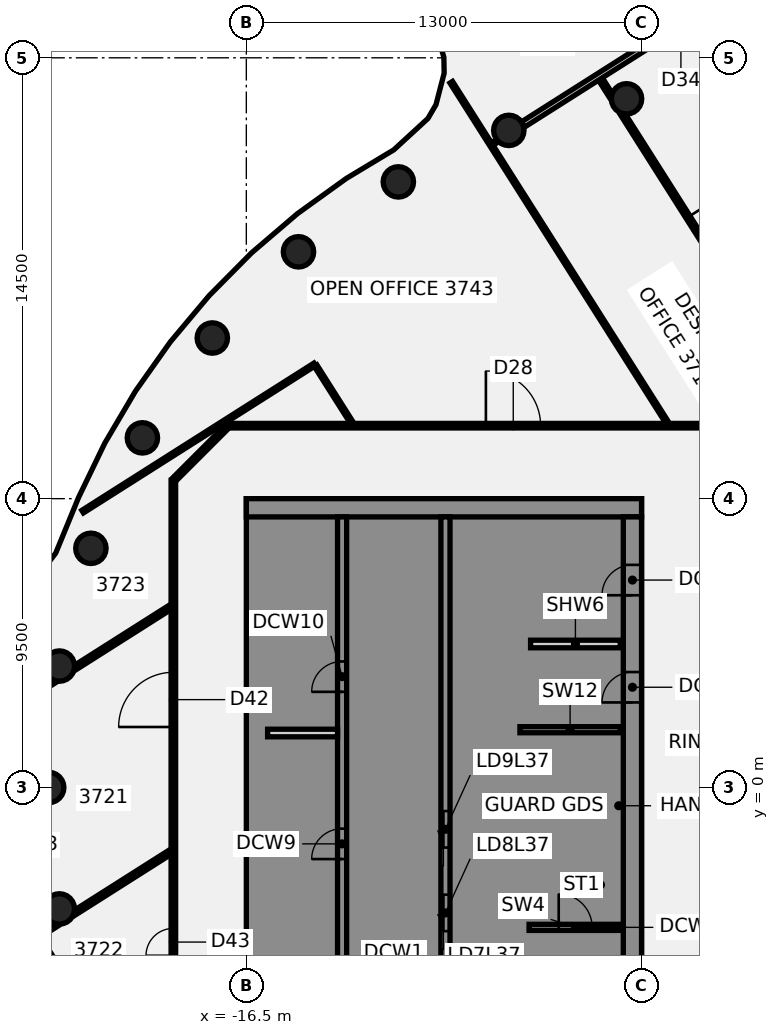
"""IFC4 building model, lengths in metres.
Left out: names, types, materials, properties, quantities, classifications, styles, units other than length and angle.
Written with IfcOpenShell. Run it as: python <this file> out.ifc"""

import sys

from ifc_helpers import new_model, si_unit, direction, frame, frame_2d, origin, origin_2d, place, context, subcontext, project, spatial, polyline, rectangle, circle, outline, extrude, element, fill, save


model = new_model("IFC4")
c1 = context("Model", 3, precision=1e-05, world=origin(), true_north=direction((0.0, 1.0)))
c2 = subcontext(c1, "Body", "Model", "MODEL_VIEW")
j1 = project(units=[si_unit("LENGTHUNIT", "METRE"), si_unit("PLANEANGLEUNIT", "RADIAN")], contexts=[c1])
p1 = place(None, origin())
s1 = spatial("IfcSite", under=j1, at=p1, CompositionType="ELEMENT")
p2 = place(p1, origin())
s2 = spatial("IfcBuilding", under=s1, at=p2, CompositionType="ELEMENT")
p3 = place(p2, frame((0.0, 0.0, 151.75)))
s3 = spatial("IfcBuildingStorey", under=s2, at=p3, CompositionType="ELEMENT", Elevation=151.75)
for number, where, z_axis, x_axis in (
    (1, (-3.994, 22.651, -0.14), (0.0, 0.0, 1.0), (1.0, 0.0, 0.0)),
    (2, (-7.866, 21.613, -0.14), (0.0, 0.0, 1.0), (1.0, 0.0, 0.0)),
    (3, (-11.5, 19.919, -0.14), (0.0, 0.0, 1.0), (1.0, 0.0, 0.0)),
    (4, (-14.784, 17.619, -0.14), (0.0, 0.0, 1.0), (1.0, 0.0, 0.0)),
    (5, (-17.619, 14.784, -0.14), (0.0, 0.0, 1.0), (1.0, 0.0, 0.0)),
    (6, (-19.919, 11.5, -0.14), (0.0, 0.0, 1.0), (1.0, 0.0, 0.0)),
    (7, (-21.613, 7.866, -0.14), (0.0, 0.0, 1.0), (1.0, 0.0, 0.0)),
    (8, (-22.651, 3.994, -0.14), (0.0, 0.0, 1.0), (1.0, 0.0, 0.0)),
    (9, (-23.0, 0.0, -0.14), (0.0, 0.0, 1.0), (1.0, 0.0, 0.0)),
    (10, (-22.651, -3.994, -0.14), (0.0, 0.0, 1.0), (1.0, 0.0, 0.0)),
):
    element("IfcColumn", number, at=place(p3, frame(where, z_axis=z_axis, x_axis=x_axis)), inside=s3, PredefinedType="COLUMN", context=c2, shape_type="SweptSolid", body=[
        extrude(circle(Radius=0.5, at=origin_2d()), origin(), (0.0, 0.0, 1.0), 3.75),
    ])
p4 = place(p3, frame((-28.798, 3.621, 0.0), z_axis=(0.0, 0.0, 1.0), x_axis=(0.535688347335, -0.844415771128, 0.0)))
e11 = element("IfcWall", 11, at=p4, inside=s3, PredefinedType="PARTITIONING", context=c2, shape_type="SweptSolid", body=[
    extrude(rectangle(XDim=13.06, YDim=0.2, at=frame_2d((6.53, 0.0))), origin(), (0.0, 0.0, 1.0), 3.01),
])
p5 = place(p4, frame((5.799, 0.0, 0.0)))
e12 = element("IfcOpeningElement", 12, at=p5, cuts=e11, PredefinedType="OPENING", context=c2, shape_type="SweptSolid", body=[
    extrude(rectangle(XDim=1.4, YDim=2.1, at=frame_2d((0.7, 1.05))), frame((0.0, 0.11, 0.0), z_axis=(0.0, -1.0, 0.0), x_axis=(1.0, 0.0, 0.0)), (0.0, 0.0, 1.0), 0.22),
])
p6 = place(p3, frame((-14.222, 13.875, 0.0), z_axis=(0.0, 0.0, 1.0), x_axis=(0.535498381377, -0.844536253539, 0.0)))
e13 = element("IfcWall", 13, at=p6, inside=s3, PredefinedType="PARTITIONING", context=c2, shape_type="SweptSolid", body=[
    extrude(rectangle(XDim=2.238, YDim=0.1, at=frame_2d((1.119, 0.0))), origin(), (0.0, 0.0, 1.0), 3.01),
])
p7 = place(p3, frame((-9.759, 23.197, 0.0), z_axis=(0.0, 0.0, 1.0), x_axis=(0.535675709716, -0.844423788166, 0.0)))
e14 = element("IfcWall", 14, at=p7, inside=s3, PredefinedType="PARTITIONING", context=c2, shape_type="SweptSolid", body=[
    extrude(rectangle(XDim=13.278, YDim=0.1, at=frame_2d((6.639, 0.0))), origin(), (0.0, 0.0, 1.0), 3.01),
])
p8 = place(p3, frame((-4.854, 23.304, 0.0), z_axis=(0.0, 0.0, 1.0), x_axis=(0.535819578174, -0.844332505382, 0.0)))
e15 = element("IfcWall", 15, at=p8, inside=s3, PredefinedType="PARTITIONING", context=c2, shape_type="SweptSolid", body=[
    extrude(rectangle(XDim=0.688, YDim=0.15, at=frame_2d((0.344, 0.0))), origin(), (0.0, 0.0, 1.0), 3.01),
])
p9 = place(p3, frame((-4.141, 22.18, 0.0), z_axis=(0.0, 0.0, 1.0), x_axis=(0.535692040385, -0.844413428285, 0.0)))
e16 = element("IfcWall", 16, at=p9, inside=s3, PredefinedType="PARTITIONING", context=c2, shape_type="SweptSolid", body=[
    extrude(rectangle(XDim=12.059, YDim=0.15, at=frame_2d((6.03, 0.0))), origin(), (0.0, 0.0, 1.0), 3.01),
])
p10 = place(p9, frame((4.05, 0.0, 0.0)))
e17 = element("IfcOpeningElement", 17, at=p10, cuts=e16, PredefinedType="OPENING", context=c2, shape_type="SweptSolid", body=[
    extrude(rectangle(XDim=0.9, YDim=2.1, at=frame_2d((0.45, 1.05))), frame((0.0, 0.085, 0.0), z_axis=(0.0, -1.0, 0.0), x_axis=(1.0, 0.0, 0.0)), (0.0, 0.0, 1.0), 0.17),
])
p11 = place(p3, frame((-17.065, 11.9, 0.0), z_axis=(0.0, 0.0, 1.0), x_axis=(1.0, 0.0, 0.0)))
e18 = element("IfcWall", 18, at=p11, inside=s3, PredefinedType="PARTITIONING", context=c2, shape_type="SweptSolid", body=[
    extrude(rectangle(XDim=34.165, YDim=0.15, at=frame_2d((17.083, 0.0))), origin(), (0.0, 0.0, 1.0), 3.01),
])
p12 = place(p11, frame((22.446, 0.0, 0.0)))
e19 = element("IfcOpeningElement", 19, at=p12, cuts=e18, PredefinedType="OPENING", context=c2, shape_type="SweptSolid", body=[
    extrude(rectangle(XDim=1.8, YDim=2.1, at=frame_2d((0.9, 1.05))), frame((0.0, 0.085, 0.0), z_axis=(0.0, -1.0, 0.0), x_axis=(1.0, 0.0, 0.0)), (0.0, 0.0, 1.0), 0.17),
])
p13 = place(p11, frame((29.079, 0.0, 0.0)))
e20 = element("IfcOpeningElement", 20, at=p13, cuts=e18, PredefinedType="OPENING", context=c2, shape_type="SweptSolid", body=[
    extrude(rectangle(XDim=1.8, YDim=2.1, at=frame_2d((0.9, 1.05))), frame((0.0, 0.085, 0.0), z_axis=(0.0, -1.0, 0.0), x_axis=(1.0, 0.0, 0.0)), (0.0, 0.0, 1.0), 0.17),
])
p14 = place(p11, frame((8.445, 0.0, 0.0)))
e21 = element("IfcOpeningElement", 21, at=p14, cuts=e18, PredefinedType="OPENING", context=c2, shape_type="SweptSolid", body=[
    extrude(rectangle(XDim=1.8, YDim=2.1, at=frame_2d((0.9, 1.05))), frame((0.0, 0.085, 0.0), z_axis=(0.0, -1.0, 0.0), x_axis=(1.0, 0.0, 0.0)), (0.0, 0.0, 1.0), 0.17),
])
p15 = place(p3, frame((-26.946, 0.89, 0.0), z_axis=(0.0, 0.0, 1.0), x_axis=(0.844458169001, 0.535621508911, 0.0)))
e22 = element("IfcWall", 22, at=p15, inside=s3, PredefinedType="PARTITIONING", context=c2, shape_type="SweptSolid", body=[
    extrude(rectangle(XDim=4.916, YDim=0.15, at=frame_2d((2.458, 0.0))), origin(), (0.0, 0.0, 1.0), 3.01),
])
p16 = place(p15, frame((2.0, 0.0, 0.0)))
e23 = element("IfcOpeningElement", 23, at=p16, cuts=e22, PredefinedType="OPENING", context=c2, shape_type="SweptSolid", body=[
    extrude(rectangle(XDim=1.8, YDim=2.1, at=frame_2d((0.9, 1.05))), frame((0.0, 0.085, 0.0), z_axis=(0.0, -1.0, 0.0), x_axis=(1.0, 0.0, 0.0)), (0.0, 0.0, 1.0), 0.17),
])
p17 = place(p3, frame((-22.159, 3.926, 0.0), z_axis=(0.0, 0.0, 1.0), x_axis=(0.844425849741, 0.535672459894, 0.0)))
e24 = element("IfcWall", 24, at=p17, inside=s3, PredefinedType="PARTITIONING", context=c2, shape_type="SweptSolid", body=[
    extrude(rectangle(XDim=3.744, YDim=0.15, at=frame_2d((1.872, 0.0))), origin(), (0.0, 0.0, 1.0), 3.01),
])
p18 = place(p3, frame((-23.304, -4.854, 0.0), z_axis=(0.0, 0.0, 1.0), x_axis=(0.844332505382, 0.535819578174, 0.0)))
e25 = element("IfcWall", 25, at=p18, inside=s3, PredefinedType="PARTITIONING", context=c2, shape_type="SweptSolid", body=[
    extrude(rectangle(XDim=0.688, YDim=0.15, at=frame_2d((0.344, 0.0))), origin(), (0.0, 0.0, 1.0), 3.01),
])
p19 = place(p3, frame((-22.18, -4.141, 0.0), z_axis=(0.0, 0.0, 1.0), x_axis=(0.844431403995, 0.535663704153, 0.0)))
e26 = element("IfcWall", 26, at=p19, inside=s3, PredefinedType="PARTITIONING", context=c2, shape_type="SweptSolid", body=[
    extrude(rectangle(XDim=3.769, YDim=0.15, at=frame_2d((1.885, 0.0))), origin(), (0.0, 0.0, 1.0), 3.01),
])
p20 = place(p3, frame((-21.885, 9.073, 0.0), z_axis=(0.0, 0.0, 1.0), x_axis=(0.844422195246, 0.535678220741, 0.0)))
e27 = element("IfcWall", 27, at=p20, inside=s3, PredefinedType="PARTITIONING", context=c2, shape_type="SweptSolid", body=[
    extrude(rectangle(XDim=9.042, YDim=0.1, at=frame_2d((4.521, 0.0))), origin(), (0.0, 0.0, 1.0), 3.01),
])
p21 = place(p3, frame((-8.411, 21.165, 0.0), z_axis=(0.0, 0.0, 1.0), x_axis=(0.844784764611, 0.535106252516, 0.0)))
e28 = element("IfcWall", 28, at=p21, inside=s3, PredefinedType="PARTITIONING", context=c2, shape_type="SweptSolid", body=[
    extrude(rectangle(XDim=0.214, YDim=0.1, at=frame_2d((0.107, 0.0))), origin(), (0.0, 0.0, 1.0), 3.01),
])
p22 = place(p3, frame((-7.407, 21.802, 0.0), z_axis=(0.0, 0.0, 1.0), x_axis=(0.844365849888, 0.535767031035, 0.0)))
e29 = element("IfcWall", 29, at=p22, inside=s3, PredefinedType="PARTITIONING", context=c2, shape_type="SweptSolid", body=[
    extrude(rectangle(XDim=13.06, YDim=0.2, at=frame_2d((6.53, 0.0))), origin(), (0.0, 0.0, 1.0), 3.01),
])
p23 = place(p22, frame((5.461, 0.0, 0.0)))
e30 = element("IfcOpeningElement", 30, at=p23, cuts=e29, PredefinedType="OPENING", context=c2, shape_type="SweptSolid", body=[
    extrude(rectangle(XDim=1.4, YDim=2.1, at=frame_2d((0.7, 1.05))), frame((0.0, 0.11, 0.0), z_axis=(0.0, -1.0, 0.0), x_axis=(1.0, 0.0, 0.0)), (0.0, 0.0, 1.0), 0.22),
])
p24 = place(p22, frame((8.461, 0.0, 0.0)))
e31 = element("IfcOpeningElement", 31, at=p24, cuts=e29, PredefinedType="OPENING", context=c2, shape_type="SweptSolid", body=[
    extrude(rectangle(XDim=0.9, YDim=2.1, at=frame_2d((0.45, 1.05))), frame((0.0, 0.11, 0.0), z_axis=(0.0, -1.0, 0.0), x_axis=(1.0, 0.0, 0.0)), (0.0, 0.0, 1.0), 0.22),
])
p25 = place(p3, frame((-18.872, 10.128, 0.0), z_axis=(0.0, 0.0, 1.0), x_axis=(0.707106781187, 0.707106781187, 0.0)))
e32 = element("IfcWall", 32, at=p25, inside=s3, PredefinedType="PARTITIONING", context=c2, shape_type="SweptSolid", body=[
    extrude(rectangle(XDim=2.505, YDim=0.15, at=frame_2d((1.253, 0.0))), origin(), (0.0, 0.0, 1.0), 3.01),
])
p26 = place(p3, frame((-18.9, -10.1, 0.0), z_axis=(0.0, 0.0, 1.0), x_axis=(0.0, 1.0, 0.0)))
e33 = element("IfcWall", 33, at=p26, inside=s3, PredefinedType="PARTITIONING", context=c2, shape_type="SweptSolid", body=[
    extrude(rectangle(XDim=20.2, YDim=0.15, at=frame_2d((10.1, 0.0))), origin(), (0.0, 0.0, 1.0), 3.01),
])
p27 = place(p26, frame((12.09, 0.0, 0.0)))
e34 = element("IfcOpeningElement", 34, at=p27, cuts=e33, PredefinedType="OPENING", context=c2, shape_type="SweptSolid", body=[
    extrude(rectangle(XDim=1.8, YDim=2.1, at=frame_2d((0.9, 1.05))), frame((0.0, 0.085, 0.0), z_axis=(0.0, -1.0, 0.0), x_axis=(1.0, 0.0, 0.0)), (0.0, 0.0, 1.0), 0.17),
])
p28 = place(p26, frame((4.566, 0.0, 0.0)))
e35 = element("IfcOpeningElement", 35, at=p28, cuts=e33, PredefinedType="OPENING", context=c2, shape_type="SweptSolid", body=[
    extrude(rectangle(XDim=0.9, YDim=2.1, at=frame_2d((0.45, 1.05))), frame((0.0, 0.085, 0.0), z_axis=(0.0, -1.0, 0.0), x_axis=(1.0, 0.0, 0.0)), (0.0, 0.0, 1.0), 0.17),
])
p29 = place(p3, origin())
e36 = element("IfcWall", 36, at=p29, inside=s3, PredefinedType="SHEAR", context=c2, shape_type="SweptSolid", body=[
    extrude(outline(polyline([(-13.5, -8.125), (-15.9, -8.125), (-15.9, -5.625), (-13.5, -5.625), (-13.5, -5.375), (-15.9, -5.375), (-15.9, 5.375), (-13.5, 5.375), (-13.5, 5.625), (-15.9, 5.625), (-15.9, 8.125), (-13.5, 8.125), (-13.5, 8.9), (-15.9, 8.9), (-16.5, 8.9), (-16.5, -8.9), (-15.9, -8.9), (-13.5, -8.9), (-13.5, -8.125)])), origin(), (0.0, 0.0, 1.0), 3.61),
])
p30 = place(p3, frame((-16.5, 9.2, 0.0), z_axis=(0.0, 0.0, 1.0), x_axis=(1.0, 0.0, 0.0)))
e37 = element("IfcWall", 37, at=p30, inside=s3, PredefinedType="SHEAR", context=c2, shape_type="SweptSolid", body=[
    extrude(rectangle(XDim=13.0, YDim=0.6, at=frame_2d((6.5, 0.0))), origin(), (0.0, 0.0, 1.0), 3.61),
])
p31 = place(p3, origin())
e38 = element("IfcWall", 38, at=p31, inside=s3, PredefinedType="SHEAR", context=c2, shape_type="SweptSolid", body=[
    extrude(outline(polyline([(-9.8, -5.375), (-9.8, -5.625), (-7.5, -5.625), (-7.2, -5.625), (-7.2, 8.9), (-7.5, 8.9), (-9.8, 8.9), (-9.8, 8.125), (-7.5, 8.125), (-7.5, 5.625), (-9.8, 5.625), (-9.8, 5.375), (-7.5, 5.375), (-7.5, 2.875), (-9.8, 2.875), (-9.8, 2.625), (-7.5, 2.625), (-7.5, 0.125), (-9.8, 0.125), (-9.8, -0.125), (-7.5, -0.125), (-7.5, -2.625), (-9.8, -2.625), (-9.8, -2.875), (-7.5, -2.875), (-7.5, -5.375), (-9.8, -5.375)])), origin(), (0.0, 0.0, 1.0), 3.61),
])
p32 = place(p3, frame((-7.5, 1.9, 0.0), z_axis=(0.0, 0.0, 1.0), x_axis=(1.0, 0.0, 0.0)))
e39 = element("IfcWall", 39, at=p32, inside=s3, PredefinedType="SHEAR", context=c2, shape_type="SweptSolid", body=[
    extrude(rectangle(XDim=3.3, YDim=0.2, at=frame_2d((1.65, 0.0))), origin(), (0.0, 0.0, 1.0), 3.61),
])
p33 = place(p3, frame((-13.35, -8.9, 0.0), z_axis=(0.0, 0.0, 1.0), x_axis=(0.0, 1.0, 0.0)))
e40 = element("IfcWall", 40, at=p33, inside=s3, PredefinedType="SHEAR", context=c2, shape_type="SweptSolid", body=[
    extrude(rectangle(XDim=17.8, YDim=0.3, at=frame_2d((8.9, 0.0))), origin(), (0.0, 0.0, 1.0), 3.61),
])
p34 = place(p33, frame((1.325, 0.0, 0.0)))
e41 = element("IfcOpeningElement", 41, at=p34, cuts=e40, PredefinedType="OPENING", context=c2, shape_type="SweptSolid", body=[
    extrude(rectangle(XDim=1.4, YDim=2.1, at=frame_2d((0.7, 1.05))), frame((0.0, 0.16, 0.0), z_axis=(0.0, -1.0, 0.0), x_axis=(1.0, 0.0, 0.0)), (0.0, 0.0, 1.0), 0.32),
])
p35 = place(p33, frame((6.546, 0.0, 0.0)))
e42 = element("IfcOpeningElement", 42, at=p35, cuts=e40, PredefinedType="OPENING", context=c2, shape_type="SweptSolid", body=[
    extrude(rectangle(XDim=1.0, YDim=2.1, at=frame_2d((0.5, 1.05))), frame((0.0, 0.16, 0.0), z_axis=(0.0, -1.0, 0.0), x_axis=(1.0, 0.0, 0.0)), (0.0, 0.0, 1.0), 0.32),
])
p36 = place(p33, frame((12.046, 0.0, 0.0)))
e43 = element("IfcOpeningElement", 43, at=p36, cuts=e40, PredefinedType="OPENING", context=c2, shape_type="SweptSolid", body=[
    extrude(rectangle(XDim=1.0, YDim=2.1, at=frame_2d((0.5, 1.05))), frame((0.0, 0.16, 0.0), z_axis=(0.0, -1.0, 0.0), x_axis=(1.0, 0.0, 0.0)), (0.0, 0.0, 1.0), 0.32),
])
p37 = place(p3, frame((-9.95, -8.9, 0.0), z_axis=(0.0, 0.0, 1.0), x_axis=(0.0, 1.0, 0.0)))
e44 = element("IfcWall", 44, at=p37, inside=s3, PredefinedType="SHEAR", context=c2, shape_type="SweptSolid", body=[
    extrude(rectangle(XDim=17.8, YDim=0.3, at=frame_2d((8.9, 0.0))), origin(), (0.0, 0.0, 1.0), 3.61),
])
p38 = place(p37, frame((4.175, 0.0, 0.0)))
e45 = element("IfcOpeningElement", 45, at=p38, cuts=e44, PredefinedType="OPENING", context=c2, shape_type="SweptSolid", body=[
    extrude(rectangle(XDim=1.2, YDim=2.1, at=frame_2d((0.6, 1.05))), frame((0.0, 0.16, 0.0), z_axis=(0.0, -1.0, 0.0), x_axis=(1.0, 0.0, 0.0)), (0.0, 0.0, 1.0), 0.32),
])
p39 = place(p37, frame((6.925, 0.0, 0.0)))
e46 = element("IfcOpeningElement", 46, at=p39, cuts=e44, PredefinedType="OPENING", context=c2, shape_type="SweptSolid", body=[
    extrude(rectangle(XDim=1.2, YDim=2.1, at=frame_2d((0.6, 1.05))), frame((0.0, 0.16, 0.0), z_axis=(0.0, -1.0, 0.0), x_axis=(1.0, 0.0, 0.0)), (0.0, 0.0, 1.0), 0.32),
])
p40 = place(p3, frame((-3.8, -8.9, 0.0), z_axis=(0.0, 0.0, 1.0), x_axis=(0.0, 1.0, 0.0)))
e47 = element("IfcWall", 47, at=p40, inside=s3, PredefinedType="SHEAR", context=c2, shape_type="SweptSolid", body=[
    extrude(rectangle(XDim=17.8, YDim=0.6, at=frame_2d((8.9, 0.0))), origin(), (0.0, 0.0, 1.0), 3.61),
])
p41 = place(p40, frame((1.25, 0.0, 0.0)))
e48 = element("IfcOpeningElement", 48, at=p41, cuts=e47, PredefinedType="OPENING", context=c2, shape_type="SweptSolid", body=[
    extrude(rectangle(XDim=1.8, YDim=2.1, at=frame_2d((0.9, 1.05))), frame((0.0, 0.31, 0.0), z_axis=(0.0, -1.0, 0.0), x_axis=(1.0, 0.0, 0.0)), (0.0, 0.0, 1.0), 0.62),
])
p42 = place(p40, frame((11.698, 0.0, 0.0)))
e49 = element("IfcOpeningElement", 49, at=p42, cuts=e47, PredefinedType="OPENING", context=c2, shape_type="SweptSolid", body=[
    extrude(rectangle(XDim=1.0, YDim=2.1, at=frame_2d((0.5, 1.05))), frame((0.0, 0.31, 0.0), z_axis=(0.0, -1.0, 0.0), x_axis=(1.0, 0.0, 0.0)), (0.0, 0.0, 1.0), 0.62),
])
p43 = place(p40, frame((15.222, 0.0, 0.0)))
e50 = element("IfcOpeningElement", 50, at=p43, cuts=e47, PredefinedType="OPENING", context=c2, shape_type="SweptSolid", body=[
    extrude(rectangle(XDim=1.0, YDim=2.1, at=frame_2d((0.5, 1.05))), frame((0.0, 0.31, 0.0), z_axis=(0.0, -1.0, 0.0), x_axis=(1.0, 0.0, 0.0)), (0.0, 0.0, 1.0), 0.62),
])
p44 = place(p3, frame((-7.15, 4.72, 0.0), z_axis=(0.0, 0.0, 1.0), x_axis=(1.0, 0.0, 0.0)))
e51 = element("IfcWall", 51, at=p44, inside=s3, PredefinedType="PARTITIONING", context=c2, shape_type="SweptSolid", body=[
    extrude(rectangle(XDim=2.95, YDim=0.25, at=frame_2d((1.475, 0.0))), origin(), (0.0, 0.0, 1.0), 3.61),
])
p45 = place(p3, frame((-7.2, -4.6, 0.0), z_axis=(0.0, 0.0, 1.0), x_axis=(1.0, 0.0, 0.0)))
e52 = element("IfcWall", 52, at=p45, inside=s3, PredefinedType="SHEAR", context=c2, shape_type="SweptSolid", body=[
    extrude(rectangle(XDim=3.1, YDim=0.2, at=frame_2d((1.55, 0.0))), origin(), (0.0, 0.0, 1.0), 3.61),
])
p46 = place(p45, frame((0.975, 0.0, 0.0)))
e53 = element("IfcOpeningElement", 53, at=p46, cuts=e52, PredefinedType="OPENING", context=c2, shape_type="SweptSolid", body=[
    extrude(rectangle(XDim=1.1, YDim=2.1, at=frame_2d((0.55, 1.05))), frame((0.0, 0.11, 0.0), z_axis=(0.0, -1.0, 0.0), x_axis=(1.0, 0.0, 0.0)), (0.0, 0.0, 1.0), 0.22),
])
p47 = place(p3, frame((-15.8, 1.792, 0.0), z_axis=(0.0, 0.0, 1.0), x_axis=(1.0, 0.0, 0.0)))
e54 = element("IfcWall", 54, at=p47, inside=s3, PredefinedType="PARTITIONING", context=c2, shape_type="SweptSolid", body=[
    extrude(rectangle(XDim=2.3, YDim=0.25, at=frame_2d((1.15, 0.0))), origin(), (0.0, 0.0, 1.0), 3.61),
])
p48 = place(p10, frame((0.9, 0.0, 0.0), z_axis=(0.0, 0.0, 1.0), x_axis=(-1.0, 0.0, 0.0)))
e55 = element("IfcDoor", 55, at=p48, inside=s3, OperationType="SINGLE_SWING_LEFT", PredefinedType="DOOR", context=c2, shape_type="SweptSolid", body=[
    extrude(rectangle(XDim=0.9, YDim=2.1, at=frame_2d((0.45, 1.05))), frame((0.0, 0.025, 0.0), z_axis=(0.0, -1.0, 0.0), x_axis=(1.0, 0.0, 0.0)), (0.0, 0.0, 1.0), 0.05),
])
fill(e17, e55)
p49 = place(p14, origin())
e56 = element("IfcDoor", 56, at=p49, inside=s3, OperationType="DOUBLE_DOOR_SINGLE_SWING", PredefinedType="DOOR", context=c2, shape_type="SweptSolid", body=[
    extrude(rectangle(XDim=1.8, YDim=2.1, at=frame_2d((0.9, 1.05))), frame((0.0, 0.025, 0.0), z_axis=(0.0, -1.0, 0.0), x_axis=(1.0, 0.0, 0.0)), (0.0, 0.0, 1.0), 0.05),
])
fill(e21, e56)
p50 = place(p27, frame((1.8, 0.0, 0.0), z_axis=(0.0, 0.0, 1.0), x_axis=(-1.0, 0.0, 0.0)))
e57 = element("IfcDoor", 57, at=p50, inside=s3, OperationType="DOUBLE_DOOR_SINGLE_SWING", PredefinedType="DOOR", context=c2, shape_type="SweptSolid", body=[
    extrude(rectangle(XDim=1.8, YDim=2.1, at=frame_2d((0.9, 1.05))), frame((0.0, 0.025, 0.0), z_axis=(0.0, -1.0, 0.0), x_axis=(1.0, 0.0, 0.0)), (0.0, 0.0, 1.0), 0.05),
])
fill(e34, e57)
p51 = place(p28, origin())
e58 = element("IfcDoor", 58, at=p51, inside=s3, OperationType="SINGLE_SWING_RIGHT", PredefinedType="DOOR", context=c2, shape_type="SweptSolid", body=[
    extrude(rectangle(XDim=0.9, YDim=2.1, at=frame_2d((0.45, 1.05))), frame((0.0, 0.025, 0.0), z_axis=(0.0, -1.0, 0.0), x_axis=(1.0, 0.0, 0.0)), (0.0, 0.0, 1.0), 0.05),
])
fill(e35, e58)
p52 = place(p42, origin())
e59 = element("IfcDoor", 59, at=p52, inside=s3, OperationType="SINGLE_SWING_LEFT", PredefinedType="DOOR", context=c2, shape_type="SweptSolid", body=[
    extrude(rectangle(XDim=1.0, YDim=2.1, at=frame_2d((0.5, 1.05))), frame((0.0, 0.275, 0.0), z_axis=(0.0, -1.0, 0.0), x_axis=(1.0, 0.0, 0.0)), (0.0, 0.0, 1.0), 0.05),
])
fill(e49, e59)
p53 = place(p43, origin())
e60 = element("IfcDoor", 60, at=p53, inside=s3, OperationType="SINGLE_SWING_LEFT", PredefinedType="DOOR", context=c2, shape_type="SweptSolid", body=[
    extrude(rectangle(XDim=1.0, YDim=2.1, at=frame_2d((0.5, 1.05))), frame((0.0, 0.275, 0.0), z_axis=(0.0, -1.0, 0.0), x_axis=(1.0, 0.0, 0.0)), (0.0, 0.0, 1.0), 0.05),
])
fill(e50, e60)
p54 = place(p46, origin())
e61 = element("IfcDoor", 61, at=p54, inside=s3, OperationType="SINGLE_SWING_LEFT", PredefinedType="DOOR", context=c2, shape_type="SweptSolid", body=[
    extrude(rectangle(XDim=1.1, YDim=2.1, at=frame_2d((0.55, 1.05))), frame((0.0, 0.025, 0.0), z_axis=(0.0, -1.0, 0.0), x_axis=(1.0, 0.0, 0.0)), (0.0, 0.0, 1.0), 0.05),
])
fill(e53, e61)
p55 = place(p38, origin())
e62 = element("IfcDoor", 62, at=p55, inside=s3, OperationType="SLIDING_TO_LEFT", PredefinedType="DOOR", context=c2, shape_type="SweptSolid", body=[
    extrude(rectangle(XDim=1.2, YDim=2.1, at=frame_2d((0.6, 1.05))), frame((0.0, 0.025, 0.0), z_axis=(0.0, -1.0, 0.0), x_axis=(1.0, 0.0, 0.0)), (0.0, 0.0, 1.0), 0.05),
])
fill(e45, e62)
p56 = place(p39, origin())
e63 = element("IfcDoor", 63, at=p56, inside=s3, OperationType="SLIDING_TO_LEFT", PredefinedType="DOOR", context=c2, shape_type="SweptSolid", body=[
    extrude(rectangle(XDim=1.2, YDim=2.1, at=frame_2d((0.6, 1.05))), frame((0.0, 0.025, 0.0), z_axis=(0.0, -1.0, 0.0), x_axis=(1.0, 0.0, 0.0)), (0.0, 0.0, 1.0), 0.05),
])
fill(e46, e63)
p57 = place(p35, origin())
e64 = element("IfcDoor", 64, at=p57, inside=s3, OperationType="SINGLE_SWING_LEFT", PredefinedType="DOOR", context=c2, shape_type="SweptSolid", body=[
    extrude(rectangle(XDim=1.0, YDim=2.1, at=frame_2d((0.5, 1.05))), frame((0.0, 0.025, 0.0), z_axis=(0.0, -1.0, 0.0), x_axis=(1.0, 0.0, 0.0)), (0.0, 0.0, 1.0), 0.05),
])
fill(e42, e64)
p58 = place(p36, origin())
e65 = element("IfcDoor", 65, at=p58, inside=s3, OperationType="SINGLE_SWING_LEFT", PredefinedType="DOOR", context=c2, shape_type="SweptSolid", body=[
    extrude(rectangle(XDim=1.0, YDim=2.1, at=frame_2d((0.5, 1.05))), frame((0.0, 0.025, 0.0), z_axis=(0.0, -1.0, 0.0), x_axis=(1.0, 0.0, 0.0)), (0.0, 0.0, 1.0), 0.05),
])
fill(e43, e65)
save(model, sys.argv[1])
